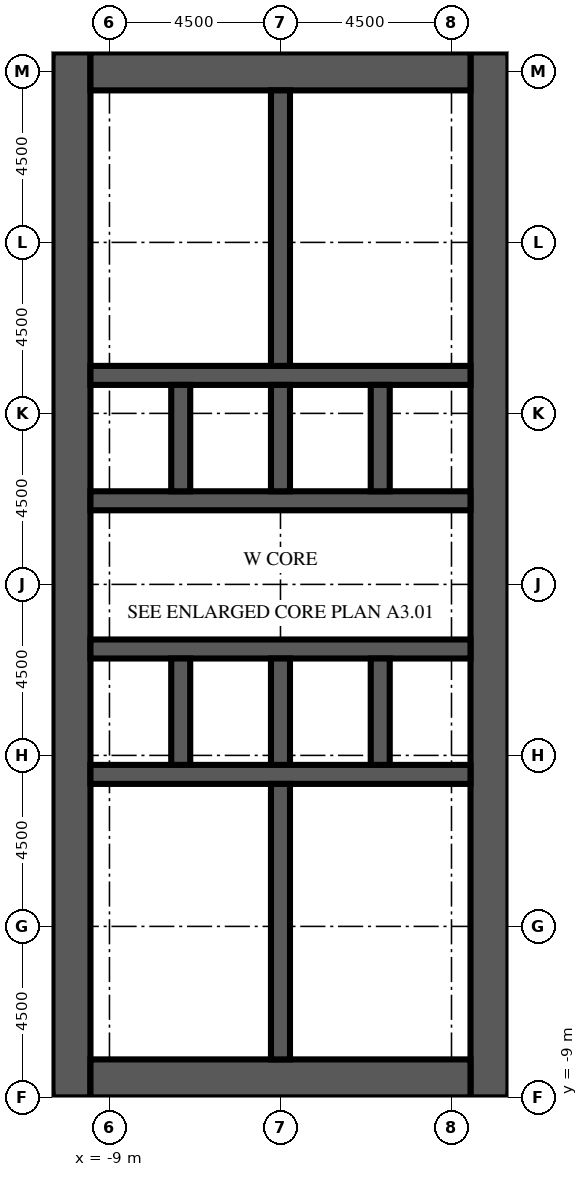
"""IFC4 building model, lengths in metres.
Left out: names, types, materials, properties, quantities, classifications, styles, units other than length and angle.
Written with IfcOpenShell. Run it as: python <this file> out.ifc"""

import sys

from ifc_helpers import new_model, si_unit, direction, frame, frame_2d, origin, place, context, subcontext, project, spatial, rectangle, extrude, element, fill, save


model = new_model("IFC4")
c1 = context("Model", 3, precision=1e-05, world=origin(), true_north=direction((0.0, 1.0)))
c2 = subcontext(c1, "Body", "Model", "MODEL_VIEW")
j1 = project(units=[si_unit("LENGTHUNIT", "METRE"), si_unit("PLANEANGLEUNIT", "RADIAN")], contexts=[c1])
p1 = place(None, origin())
s1 = spatial("IfcSite", under=j1, at=p1, CompositionType="ELEMENT")
p2 = place(p1, origin())
s2 = spatial("IfcBuilding", under=s1, at=p2, CompositionType="ELEMENT")
p3 = place(p2, frame((0.0, 0.0, -10.0)))
s3 = spatial("IfcBuildingStorey", under=s2, at=p3, CompositionType="ELEMENT", Elevation=-10.0)
p4 = place(p3, frame((-10.0, -9.0, 0.0), z_axis=(0.0, 0.0, 1.0), x_axis=(0.0, 1.0, 0.0)))
e1 = element("IfcWall", 1, at=p4, inside=s3, PredefinedType="SHEAR", context=c2, shape_type="SweptSolid", body=[
    extrude(rectangle(XDim=27.5, YDim=1.0, at=frame_2d((13.75, 0.0))), origin(), (0.0, 0.0, 1.0), 5.0),
])
p5 = place(p4, frame((12.55, 0.0, 0.0)))
e2 = element("IfcOpeningElement", 2, at=p5, cuts=e1, PredefinedType="OPENING", context=c2, shape_type="SweptSolid", body=[
    extrude(rectangle(XDim=2.4, YDim=2.4, at=frame_2d((1.2, 1.2))), frame((0.0, 0.51, 0.0), z_axis=(0.0, -1.0, 0.0), x_axis=(1.0, 0.0, 0.0)), (0.0, 0.0, 1.0), 1.02),
])
p6 = place(p4, frame((6.825, 0.0, 0.0)))
e3 = element("IfcOpeningElement", 3, at=p6, cuts=e1, PredefinedType="OPENING", context=c2, shape_type="SweptSolid", body=[
    extrude(rectangle(XDim=1.2, YDim=2.1, at=frame_2d((0.6, 1.05))), frame((0.0, 0.51, 0.0), z_axis=(0.0, -1.0, 0.0), x_axis=(1.0, 0.0, 0.0)), (0.0, 0.0, 1.0), 1.02),
])
p7 = place(p4, frame((19.475, 0.0, 0.0)))
e4 = element("IfcOpeningElement", 4, at=p7, cuts=e1, PredefinedType="OPENING", context=c2, shape_type="SweptSolid", body=[
    extrude(rectangle(XDim=1.2, YDim=2.1, at=frame_2d((0.6, 1.05))), frame((0.0, 0.51, 0.0), z_axis=(0.0, -1.0, 0.0), x_axis=(1.0, 0.0, 0.0)), (0.0, 0.0, 1.0), 1.02),
])
p8 = place(p3, frame((1.0, -9.0, 0.0), z_axis=(0.0, 0.0, 1.0), x_axis=(0.0, 1.0, 0.0)))
e5 = element("IfcWall", 5, at=p8, inside=s3, PredefinedType="SHEAR", context=c2, shape_type="SweptSolid", body=[
    extrude(rectangle(XDim=27.5, YDim=1.0, at=frame_2d((13.75, 0.0))), origin(), (0.0, 0.0, 1.0), 5.0),
])
p9 = place(p8, frame((12.55, 0.0, 0.0)))
e6 = element("IfcOpeningElement", 6, at=p9, cuts=e5, PredefinedType="OPENING", context=c2, shape_type="SweptSolid", body=[
    extrude(rectangle(XDim=2.4, YDim=2.4, at=frame_2d((1.2, 1.2))), frame((0.0, 0.51, 0.0), z_axis=(0.0, -1.0, 0.0), x_axis=(1.0, 0.0, 0.0)), (0.0, 0.0, 1.0), 1.02),
])
p10 = place(p8, frame((4.025, 0.0, 0.0)))
e7 = element("IfcOpeningElement", 7, at=p10, cuts=e5, PredefinedType="OPENING", context=c2, shape_type="SweptSolid", body=[
    extrude(rectangle(XDim=1.2, YDim=2.1, at=frame_2d((0.6, 1.05))), frame((0.0, 0.51, 0.0), z_axis=(0.0, -1.0, 0.0), x_axis=(1.0, 0.0, 0.0)), (0.0, 0.0, 1.0), 1.02),
])
p11 = place(p8, frame((19.475, 0.0, 0.0)))
e8 = element("IfcOpeningElement", 8, at=p11, cuts=e5, PredefinedType="OPENING", context=c2, shape_type="SweptSolid", body=[
    extrude(rectangle(XDim=1.0, YDim=2.1, at=frame_2d((0.5, 1.05))), frame((0.0, 0.51, 0.0), z_axis=(0.0, -1.0, 0.0), x_axis=(1.0, 0.0, 0.0)), (0.0, 0.0, 1.0), 1.02),
])
p12 = place(p8, frame((21.106, 0.0, 0.0)))
e9 = element("IfcOpeningElement", 9, at=p12, cuts=e5, PredefinedType="OPENING", context=c2, shape_type="SweptSolid", body=[
    extrude(rectangle(XDim=1.0, YDim=2.1, at=frame_2d((0.5, 1.05))), frame((0.0, 0.51, 0.0), z_axis=(0.0, -1.0, 0.0), x_axis=(1.0, 0.0, 0.0)), (0.0, 0.0, 1.0), 1.02),
])
p13 = place(p8, frame((23.1, 0.0, 0.0)))
e10 = element("IfcOpeningElement", 10, at=p13, cuts=e5, PredefinedType="OPENING", context=c2, shape_type="SweptSolid", body=[
    extrude(rectangle(XDim=1.0, YDim=2.1, at=frame_2d((0.5, 1.05))), frame((0.0, 0.51, 0.0), z_axis=(0.0, -1.0, 0.0), x_axis=(1.0, 0.0, 0.0)), (0.0, 0.0, 1.0), 1.02),
])
p14 = place(p8, frame((25.094, 0.0, 0.0)))
e11 = element("IfcOpeningElement", 11, at=p14, cuts=e5, PredefinedType="OPENING", context=c2, shape_type="SweptSolid", body=[
    extrude(rectangle(XDim=1.0, YDim=2.1, at=frame_2d((0.5, 1.05))), frame((0.0, 0.51, 0.0), z_axis=(0.0, -1.0, 0.0), x_axis=(1.0, 0.0, 0.0)), (0.0, 0.0, 1.0), 1.02),
])
for number, where, z_axis, x_axis in (
    (12, (-9.5, -8.5, 0.0), (0.0, 0.0, 1.0), (1.0, 0.0, 0.0)),
    (13, (-9.5, 18.0, 0.0), (0.0, 0.0, 1.0), (1.0, 0.0, 0.0)),
):
    element("IfcWall", number, at=place(p3, frame(where, z_axis=z_axis, x_axis=x_axis)), inside=s3, PredefinedType="SHEAR", context=c2, shape_type="SweptSolid", body=[
        extrude(rectangle(XDim=10.0, YDim=1.0, at=frame_2d((5.0, 0.0))), origin(), (0.0, 0.0, 1.0), 5.0),
    ])
p15 = place(p3, frame((-9.5, -0.5, 0.0), z_axis=(0.0, 0.0, 1.0), x_axis=(1.0, 0.0, 0.0)))
e14 = element("IfcWall", 14, at=p15, inside=s3, PredefinedType="SHEAR", context=c2, shape_type="SweptSolid", body=[
    extrude(rectangle(XDim=10.0, YDim=0.5, at=frame_2d((5.0, 0.0))), origin(), (0.0, 0.0, 1.0), 5.0),
])
p16 = place(p3, frame((-9.5, 2.8, 0.0), z_axis=(0.0, 0.0, 1.0), x_axis=(1.0, 0.0, 0.0)))
e15 = element("IfcWall", 15, at=p16, inside=s3, PredefinedType="SHEAR", context=c2, shape_type="SweptSolid", body=[
    extrude(rectangle(XDim=10.0, YDim=0.5, at=frame_2d((5.0, 0.0))), origin(), (0.0, 0.0, 1.0), 5.0),
])
p17 = place(p16, frame((0.512, 0.0, 0.0)))
e16 = element("IfcOpeningElement", 16, at=p17, cuts=e15, PredefinedType="OPENING", context=c2, shape_type="SweptSolid", body=[
    extrude(rectangle(XDim=1.1, YDim=2.1, at=frame_2d((0.55, 1.05))), frame((0.0, 0.26, 0.0), z_axis=(0.0, -1.0, 0.0), x_axis=(1.0, 0.0, 0.0)), (0.0, 0.0, 1.0), 0.52),
])
p18 = place(p16, frame((3.137, 0.0, 0.0)))
e17 = element("IfcOpeningElement", 17, at=p18, cuts=e15, PredefinedType="OPENING", context=c2, shape_type="SweptSolid", body=[
    extrude(rectangle(XDim=1.1, YDim=2.1, at=frame_2d((0.55, 1.05))), frame((0.0, 0.26, 0.0), z_axis=(0.0, -1.0, 0.0), x_axis=(1.0, 0.0, 0.0)), (0.0, 0.0, 1.0), 0.52),
])
p19 = place(p16, frame((8.387, 0.0, 0.0)))
e18 = element("IfcOpeningElement", 18, at=p19, cuts=e15, PredefinedType="OPENING", context=c2, shape_type="SweptSolid", body=[
    extrude(rectangle(XDim=1.1, YDim=2.1, at=frame_2d((0.55, 1.05))), frame((0.0, 0.26, 0.0), z_axis=(0.0, -1.0, 0.0), x_axis=(1.0, 0.0, 0.0)), (0.0, 0.0, 1.0), 0.52),
])
p20 = place(p16, frame((5.812, 0.0, 0.0)))
e19 = element("IfcOpeningElement", 19, at=p20, cuts=e15, PredefinedType="OPENING", context=c2, shape_type="SweptSolid", body=[
    extrude(rectangle(XDim=1.0, YDim=2.1, at=frame_2d((0.5, 1.05))), frame((0.0, 0.26, 0.0), z_axis=(0.0, -1.0, 0.0), x_axis=(1.0, 0.0, 0.0)), (0.0, 0.0, 1.0), 0.52),
])
p21 = place(p3, frame((-9.5, 6.7, 0.0), z_axis=(0.0, 0.0, 1.0), x_axis=(1.0, 0.0, 0.0)))
e20 = element("IfcWall", 20, at=p21, inside=s3, PredefinedType="SHEAR", context=c2, shape_type="SweptSolid", body=[
    extrude(rectangle(XDim=10.0, YDim=0.5, at=frame_2d((5.0, 0.0))), origin(), (0.0, 0.0, 1.0), 5.0),
])
p22 = place(p21, frame((0.512, 0.0, 0.0)))
e21 = element("IfcOpeningElement", 21, at=p22, cuts=e20, PredefinedType="OPENING", context=c2, shape_type="SweptSolid", body=[
    extrude(rectangle(XDim=1.1, YDim=2.1, at=frame_2d((0.55, 1.05))), frame((0.0, 0.26, 0.0), z_axis=(0.0, -1.0, 0.0), x_axis=(1.0, 0.0, 0.0)), (0.0, 0.0, 1.0), 0.52),
])
p23 = place(p21, frame((3.188, 0.0, 0.0)))
e22 = element("IfcOpeningElement", 22, at=p23, cuts=e20, PredefinedType="OPENING", context=c2, shape_type="SweptSolid", body=[
    extrude(rectangle(XDim=1.0, YDim=2.1, at=frame_2d((0.5, 1.05))), frame((0.0, 0.26, 0.0), z_axis=(0.0, -1.0, 0.0), x_axis=(1.0, 0.0, 0.0)), (0.0, 0.0, 1.0), 0.52),
])
p24 = place(p21, frame((5.812, 0.0, 0.0)))
e23 = element("IfcOpeningElement", 23, at=p24, cuts=e20, PredefinedType="OPENING", context=c2, shape_type="SweptSolid", body=[
    extrude(rectangle(XDim=1.0, YDim=2.1, at=frame_2d((0.5, 1.05))), frame((0.0, 0.26, 0.0), z_axis=(0.0, -1.0, 0.0), x_axis=(1.0, 0.0, 0.0)), (0.0, 0.0, 1.0), 0.52),
])
p25 = place(p21, frame((8.438, 0.0, 0.0)))
e24 = element("IfcOpeningElement", 24, at=p25, cuts=e20, PredefinedType="OPENING", context=c2, shape_type="SweptSolid", body=[
    extrude(rectangle(XDim=1.0, YDim=2.1, at=frame_2d((0.5, 1.05))), frame((0.0, 0.26, 0.0), z_axis=(0.0, -1.0, 0.0), x_axis=(1.0, 0.0, 0.0)), (0.0, 0.0, 1.0), 0.52),
])
p26 = place(p3, frame((-9.5, 10.0, 0.0), z_axis=(0.0, 0.0, 1.0), x_axis=(1.0, 0.0, 0.0)))
e25 = element("IfcWall", 25, at=p26, inside=s3, PredefinedType="SHEAR", context=c2, shape_type="SweptSolid", body=[
    extrude(rectangle(XDim=10.0, YDim=0.5, at=frame_2d((5.0, 0.0))), origin(), (0.0, 0.0, 1.0), 5.0),
])
for number, where, z_axis, x_axis in (
    (26, (-7.125, -0.25, 0.0), (0.0, 0.0, 1.0), (0.0, 1.0, 0.0)),
    (27, (-7.125, 6.95, 0.0), (0.0, 0.0, 1.0), (0.0, 1.0, 0.0)),
    (28, (-4.5, -0.25, 0.0), (0.0, 0.0, 1.0), (0.0, 1.0, 0.0)),
    (29, (-4.5, 6.95, 0.0), (0.0, 0.0, 1.0), (0.0, 1.0, 0.0)),
    (30, (-1.875, -0.25, 0.0), (0.0, 0.0, 1.0), (0.0, 1.0, 0.0)),
    (31, (-1.875, 6.95, 0.0), (0.0, 0.0, 1.0), (0.0, 1.0, 0.0)),
):
    element("IfcWall", number, at=place(p3, frame(where, z_axis=z_axis, x_axis=x_axis)), inside=s3, PredefinedType="SHEAR", context=c2, shape_type="SweptSolid", body=[
        extrude(rectangle(XDim=2.8, YDim=0.5, at=frame_2d((1.4, 0.0))), origin(), (0.0, 0.0, 1.0), 5.0),
    ])
for number, where, z_axis, x_axis in (
    (32, (-4.5, -8.0, 0.0), (0.0, 0.0, 1.0), (0.0, 1.0, 0.0)),
    (33, (-4.5, 10.25, 0.0), (0.0, 0.0, 1.0), (0.0, 1.0, 0.0)),
):
    element("IfcWall", number, at=place(p3, frame(where, z_axis=z_axis, x_axis=x_axis)), inside=s3, PredefinedType="SHEAR", context=c2, shape_type="SweptSolid", body=[
        extrude(rectangle(XDim=7.25, YDim=0.5, at=frame_2d((3.625, 0.0))), origin(), (0.0, 0.0, 1.0), 5.0),
    ])
p27 = place(p3, frame((-1.1, -5.825, 0.0), z_axis=(0.0, 0.0, 1.0), x_axis=(1.0, 0.0, 0.0)))
e34 = element("IfcWall", 34, at=p27, inside=s3, PredefinedType="PARTITIONING", context=c2, shape_type="SweptSolid", body=[
    extrude(rectangle(XDim=1.6, YDim=0.1, at=frame_2d((0.8, 0.0))), origin(), (0.0, 0.0, 1.0), 4.6),
])
p28 = place(p27, frame((0.3, 0.0, 0.0)))
e35 = element("IfcOpeningElement", 35, at=p28, cuts=e34, PredefinedType="OPENING", context=c2, shape_type="SweptSolid", body=[
    extrude(rectangle(XDim=1.0, YDim=2.1, at=frame_2d((0.5, 1.05))), frame((0.0, 0.06, 0.0), z_axis=(0.0, -1.0, 0.0), x_axis=(1.0, 0.0, 0.0)), (0.0, 0.0, 1.0), 0.12),
])
p29 = place(p3, frame((-1.1, -2.925, 0.0), z_axis=(0.0, 0.0, 1.0), x_axis=(1.0, 0.0, 0.0)))
e36 = element("IfcWall", 36, at=p29, inside=s3, PredefinedType="PARTITIONING", context=c2, shape_type="SweptSolid", body=[
    extrude(rectangle(XDim=1.6, YDim=0.1, at=frame_2d((0.8, 0.0))), origin(), (0.0, 0.0, 1.0), 4.6),
])
p30 = place(p29, frame((0.3, 0.0, 0.0)))
e37 = element("IfcOpeningElement", 37, at=p30, cuts=e36, PredefinedType="OPENING", context=c2, shape_type="SweptSolid", body=[
    extrude(rectangle(XDim=1.0, YDim=2.1, at=frame_2d((0.5, 1.05))), frame((0.0, 0.06, 0.0), z_axis=(0.0, -1.0, 0.0), x_axis=(1.0, 0.0, 0.0)), (0.0, 0.0, 1.0), 0.12),
])
p31 = place(p3, frame((-1.1, -5.825, 0.0), z_axis=(0.0, 0.0, 1.0), x_axis=(0.0, 1.0, 0.0)))
e38 = element("IfcWall", 38, at=p31, inside=s3, PredefinedType="PARTITIONING", context=c2, shape_type="SweptSolid", body=[
    extrude(rectangle(XDim=2.9, YDim=0.1, at=frame_2d((1.45, 0.0))), origin(), (0.0, 0.0, 1.0), 4.6),
])
p32 = place(p31, frame((0.95, 0.0, 0.0)))
e39 = element("IfcOpeningElement", 39, at=p32, cuts=e38, PredefinedType="OPENING", context=c2, shape_type="SweptSolid", body=[
    extrude(rectangle(XDim=1.0, YDim=2.1, at=frame_2d((0.5, 1.05))), frame((0.0, 0.06, 0.0), z_axis=(0.0, -1.0, 0.0), x_axis=(1.0, 0.0, 0.0)), (0.0, 0.0, 1.0), 0.12),
])
for number, where, z_axis, x_axis in (
    (40, (-4.25, -5.825, 0.0), (0.0, 0.0, 1.0), (1.0, 0.0, 0.0)),
    (41, (-4.25, -2.925, 0.0), (0.0, 0.0, 1.0), (1.0, 0.0, 0.0)),
):
    element("IfcWall", number, at=place(p3, frame(where, z_axis=z_axis, x_axis=x_axis)), inside=s3, PredefinedType="PARTITIONING", context=c2, shape_type="SweptSolid", body=[
        extrude(rectangle(XDim=3.15, YDim=0.1, at=frame_2d((1.575, 0.0))), origin(), (0.0, 0.0, 1.0), 4.6),
    ])
for number, where, z_axis, x_axis in (
    (42, (-4.25, 11.7, 0.0), (0.0, 0.0, 1.0), (1.0, 0.0, 0.0)),
    (43, (-4.25, 13.512, 0.0), (0.0, 0.0, 1.0), (1.0, 0.0, 0.0)),
    (44, (-4.25, 15.688, 0.0), (0.0, 0.0, 1.0), (1.0, 0.0, 0.0)),
):
    element("IfcWall", number, at=place(p3, frame(where, z_axis=z_axis, x_axis=x_axis)), inside=s3, PredefinedType="PARTITIONING", context=c2, shape_type="SweptSolid", body=[
        extrude(rectangle(XDim=4.75, YDim=0.1, at=frame_2d((2.375, 0.0))), origin(), (0.0, 0.0, 1.0), 4.6),
    ])
p33 = place(p3, frame((-12.7, -9.0, 0.0), z_axis=(0.0, 0.0, 1.0), x_axis=(1.0, 0.0, 0.0)))
e45 = element("IfcWall", 45, at=p33, inside=s3, PredefinedType="PARTITIONING", context=c2, shape_type="SweptSolid", body=[
    extrude(rectangle(XDim=2.2, YDim=0.15, at=frame_2d((1.1, 0.0))), origin(), (0.0, 0.0, 1.0), 4.6),
])
p34 = place(p33, frame((0.25, 0.0, 0.0)))
e46 = element("IfcOpeningElement", 46, at=p34, cuts=e45, PredefinedType="OPENING", context=c2, shape_type="SweptSolid", body=[
    extrude(rectangle(XDim=1.7, YDim=2.1, at=frame_2d((0.85, 1.05))), frame((0.0, 0.085, 0.0), z_axis=(0.0, -1.0, 0.0), x_axis=(1.0, 0.0, 0.0)), (0.0, 0.0, 1.0), 0.17),
])
p35 = place(p3, frame((-12.7, 18.5, 0.0), z_axis=(0.0, 0.0, 1.0), x_axis=(1.0, 0.0, 0.0)))
e47 = element("IfcWall", 47, at=p35, inside=s3, PredefinedType="PARTITIONING", context=c2, shape_type="SweptSolid", body=[
    extrude(rectangle(XDim=2.2, YDim=0.15, at=frame_2d((1.1, 0.0))), origin(), (0.0, 0.0, 1.0), 4.6),
])
p36 = place(p35, frame((0.25, 0.0, 0.0)))
e48 = element("IfcOpeningElement", 48, at=p36, cuts=e47, PredefinedType="OPENING", context=c2, shape_type="SweptSolid", body=[
    extrude(rectangle(XDim=1.7, YDim=2.1, at=frame_2d((0.85, 1.05))), frame((0.0, 0.085, 0.0), z_axis=(0.0, -1.0, 0.0), x_axis=(1.0, 0.0, 0.0)), (0.0, 0.0, 1.0), 0.17),
])
p37 = place(p17, origin())
e49 = element("IfcDoor", 49, at=p37, inside=s3, OperationType="DOUBLE_DOOR_SLIDING", PredefinedType="DOOR", context=c2, shape_type="SweptSolid", body=[
    extrude(rectangle(XDim=1.1, YDim=2.1, at=frame_2d((0.55, 1.05))), frame((0.0, 0.025, 0.0), z_axis=(0.0, -1.0, 0.0), x_axis=(1.0, 0.0, 0.0)), (0.0, 0.0, 1.0), 0.05),
])
fill(e16, e49)
p38 = place(p18, origin())
e50 = element("IfcDoor", 50, at=p38, inside=s3, OperationType="DOUBLE_DOOR_SLIDING", PredefinedType="DOOR", context=c2, shape_type="SweptSolid", body=[
    extrude(rectangle(XDim=1.1, YDim=2.1, at=frame_2d((0.55, 1.05))), frame((0.0, 0.025, 0.0), z_axis=(0.0, -1.0, 0.0), x_axis=(1.0, 0.0, 0.0)), (0.0, 0.0, 1.0), 0.05),
])
fill(e17, e50)
p39 = place(p19, origin())
e51 = element("IfcDoor", 51, at=p39, inside=s3, OperationType="DOUBLE_DOOR_SLIDING", PredefinedType="DOOR", context=c2, shape_type="SweptSolid", body=[
    extrude(rectangle(XDim=1.1, YDim=2.1, at=frame_2d((0.55, 1.05))), frame((0.0, 0.025, 0.0), z_axis=(0.0, -1.0, 0.0), x_axis=(1.0, 0.0, 0.0)), (0.0, 0.0, 1.0), 0.05),
])
fill(e18, e51)
p40 = place(p22, origin())
e52 = element("IfcDoor", 52, at=p40, inside=s3, OperationType="DOUBLE_DOOR_SLIDING", PredefinedType="DOOR", context=c2, shape_type="SweptSolid", body=[
    extrude(rectangle(XDim=1.1, YDim=2.1, at=frame_2d((0.55, 1.05))), frame((0.0, 0.025, 0.0), z_axis=(0.0, -1.0, 0.0), x_axis=(1.0, 0.0, 0.0)), (0.0, 0.0, 1.0), 0.05),
])
fill(e21, e52)
p41 = place(p5, origin())
e53 = element("IfcDoor", 53, at=p41, inside=s3, OperationType="DOUBLE_DOOR_DOUBLE_SWING", PredefinedType="DOOR", context=c2, shape_type="SweptSolid", body=[
    extrude(rectangle(XDim=2.4, YDim=2.4, at=frame_2d((1.2, 1.2))), frame((0.0, 0.025, 0.0), z_axis=(0.0, -1.0, 0.0), x_axis=(1.0, 0.0, 0.0)), (0.0, 0.0, 1.0), 0.05),
])
fill(e2, e53)
p42 = place(p9, origin())
e54 = element("IfcDoor", 54, at=p42, inside=s3, OperationType="DOUBLE_DOOR_DOUBLE_SWING", PredefinedType="DOOR", context=c2, shape_type="SweptSolid", body=[
    extrude(rectangle(XDim=2.4, YDim=2.4, at=frame_2d((1.2, 1.2))), frame((0.0, 0.025, 0.0), z_axis=(0.0, -1.0, 0.0), x_axis=(1.0, 0.0, 0.0)), (0.0, 0.0, 1.0), 0.05),
])
fill(e6, e54)
p43 = place(p6, origin())
e55 = element("IfcDoor", 55, at=p43, inside=s3, OperationType="SINGLE_SWING_LEFT", PredefinedType="DOOR", context=c2, shape_type="SweptSolid", body=[
    extrude(rectangle(XDim=1.2, YDim=2.1, at=frame_2d((0.6, 1.05))), frame((0.0, 0.025, 0.0), z_axis=(0.0, -1.0, 0.0), x_axis=(1.0, 0.0, 0.0)), (0.0, 0.0, 1.0), 0.05),
])
fill(e3, e55)
p44 = place(p7, origin())
e56 = element("IfcDoor", 56, at=p44, inside=s3, OperationType="SINGLE_SWING_LEFT", PredefinedType="DOOR", context=c2, shape_type="SweptSolid", body=[
    extrude(rectangle(XDim=1.2, YDim=2.1, at=frame_2d((0.6, 1.05))), frame((0.0, 0.025, 0.0), z_axis=(0.0, -1.0, 0.0), x_axis=(1.0, 0.0, 0.0)), (0.0, 0.0, 1.0), 0.05),
])
fill(e4, e56)
p45 = place(p20, origin())
e57 = element("IfcDoor", 57, at=p45, inside=s3, OperationType="SINGLE_SWING_LEFT", PredefinedType="DOOR", context=c2, shape_type="SweptSolid", body=[
    extrude(rectangle(XDim=1.0, YDim=2.1, at=frame_2d((0.5, 1.05))), frame((0.0, 0.025, 0.0), z_axis=(0.0, -1.0, 0.0), x_axis=(1.0, 0.0, 0.0)), (0.0, 0.0, 1.0), 0.05),
])
fill(e19, e57)
p46 = place(p23, origin())
e58 = element("IfcDoor", 58, at=p46, inside=s3, OperationType="SINGLE_SWING_RIGHT", PredefinedType="DOOR", context=c2, shape_type="SweptSolid", body=[
    extrude(rectangle(XDim=1.0, YDim=2.1, at=frame_2d((0.5, 1.05))), frame((0.0, 0.025, 0.0), z_axis=(0.0, -1.0, 0.0), x_axis=(1.0, 0.0, 0.0)), (0.0, 0.0, 1.0), 0.05),
])
fill(e22, e58)
p47 = place(p24, origin())
e59 = element("IfcDoor", 59, at=p47, inside=s3, OperationType="SINGLE_SWING_LEFT", PredefinedType="DOOR", context=c2, shape_type="SweptSolid", body=[
    extrude(rectangle(XDim=1.0, YDim=2.1, at=frame_2d((0.5, 1.05))), frame((0.0, 0.025, 0.0), z_axis=(0.0, -1.0, 0.0), x_axis=(1.0, 0.0, 0.0)), (0.0, 0.0, 1.0), 0.05),
])
fill(e23, e59)
p48 = place(p25, origin())
e60 = element("IfcDoor", 60, at=p48, inside=s3, OperationType="SINGLE_SWING_RIGHT", PredefinedType="DOOR", context=c2, shape_type="SweptSolid", body=[
    extrude(rectangle(XDim=1.0, YDim=2.1, at=frame_2d((0.5, 1.05))), frame((0.0, 0.025, 0.0), z_axis=(0.0, -1.0, 0.0), x_axis=(1.0, 0.0, 0.0)), (0.0, 0.0, 1.0), 0.05),
])
fill(e24, e60)
p49 = place(p10, origin())
e61 = element("IfcDoor", 61, at=p49, inside=s3, OperationType="SINGLE_SWING_LEFT", PredefinedType="DOOR", context=c2, shape_type="SweptSolid", body=[
    extrude(rectangle(XDim=1.2, YDim=2.1, at=frame_2d((0.6, 1.05))), frame((0.0, 0.475, 0.0), z_axis=(0.0, -1.0, 0.0), x_axis=(1.0, 0.0, 0.0)), (0.0, 0.0, 1.0), 0.05),
])
fill(e7, e61)
p50 = place(p28, origin())
e62 = element("IfcDoor", 62, at=p50, inside=s3, OperationType="SINGLE_SWING_RIGHT", PredefinedType="DOOR", context=c2, shape_type="SweptSolid", body=[
    extrude(rectangle(XDim=1.0, YDim=2.1, at=frame_2d((0.5, 1.05))), frame((0.0, 0.025, 0.0), z_axis=(0.0, -1.0, 0.0), x_axis=(1.0, 0.0, 0.0)), (0.0, 0.0, 1.0), 0.05),
])
fill(e35, e62)
p51 = place(p30, origin())
e63 = element("IfcDoor", 63, at=p51, inside=s3, OperationType="SINGLE_SWING_LEFT", PredefinedType="DOOR", context=c2, shape_type="SweptSolid", body=[
    extrude(rectangle(XDim=1.0, YDim=2.1, at=frame_2d((0.5, 1.05))), frame((0.0, 0.025, 0.0), z_axis=(0.0, -1.0, 0.0), x_axis=(1.0, 0.0, 0.0)), (0.0, 0.0, 1.0), 0.05),
])
fill(e37, e63)
p52 = place(p32, origin())
e64 = element("IfcDoor", 64, at=p52, inside=s3, OperationType="SINGLE_SWING_RIGHT", PredefinedType="DOOR", context=c2, shape_type="SweptSolid", body=[
    extrude(rectangle(XDim=1.0, YDim=2.1, at=frame_2d((0.5, 1.05))), frame((0.0, 0.025, 0.0), z_axis=(0.0, -1.0, 0.0), x_axis=(1.0, 0.0, 0.0)), (0.0, 0.0, 1.0), 0.05),
])
fill(e39, e64)
p53 = place(p11, origin())
e65 = element("IfcDoor", 65, at=p53, inside=s3, OperationType="SINGLE_SWING_LEFT", PredefinedType="DOOR", context=c2, shape_type="SweptSolid", body=[
    extrude(rectangle(XDim=1.0, YDim=2.1, at=frame_2d((0.5, 1.05))), frame((0.0, 0.475, 0.0), z_axis=(0.0, -1.0, 0.0), x_axis=(1.0, 0.0, 0.0)), (0.0, 0.0, 1.0), 0.05),
])
fill(e8, e65)
p54 = place(p12, origin())
e66 = element("IfcDoor", 66, at=p54, inside=s3, OperationType="SINGLE_SWING_RIGHT", PredefinedType="DOOR", context=c2, shape_type="SweptSolid", body=[
    extrude(rectangle(XDim=1.0, YDim=2.1, at=frame_2d((0.5, 1.05))), frame((0.0, 0.475, 0.0), z_axis=(0.0, -1.0, 0.0), x_axis=(1.0, 0.0, 0.0)), (0.0, 0.0, 1.0), 0.05),
])
fill(e9, e66)
p55 = place(p13, origin())
e67 = element("IfcDoor", 67, at=p55, inside=s3, OperationType="SINGLE_SWING_LEFT", PredefinedType="DOOR", context=c2, shape_type="SweptSolid", body=[
    extrude(rectangle(XDim=1.0, YDim=2.1, at=frame_2d((0.5, 1.05))), frame((0.0, 0.475, 0.0), z_axis=(0.0, -1.0, 0.0), x_axis=(1.0, 0.0, 0.0)), (0.0, 0.0, 1.0), 0.05),
])
fill(e10, e67)
p56 = place(p14, origin())
e68 = element("IfcDoor", 68, at=p56, inside=s3, OperationType="SINGLE_SWING_RIGHT", PredefinedType="DOOR", context=c2, shape_type="SweptSolid", body=[
    extrude(rectangle(XDim=1.0, YDim=2.1, at=frame_2d((0.5, 1.05))), frame((0.0, 0.475, 0.0), z_axis=(0.0, -1.0, 0.0), x_axis=(1.0, 0.0, 0.0)), (0.0, 0.0, 1.0), 0.05),
])
fill(e11, e68)
save(model, sys.argv[1])
